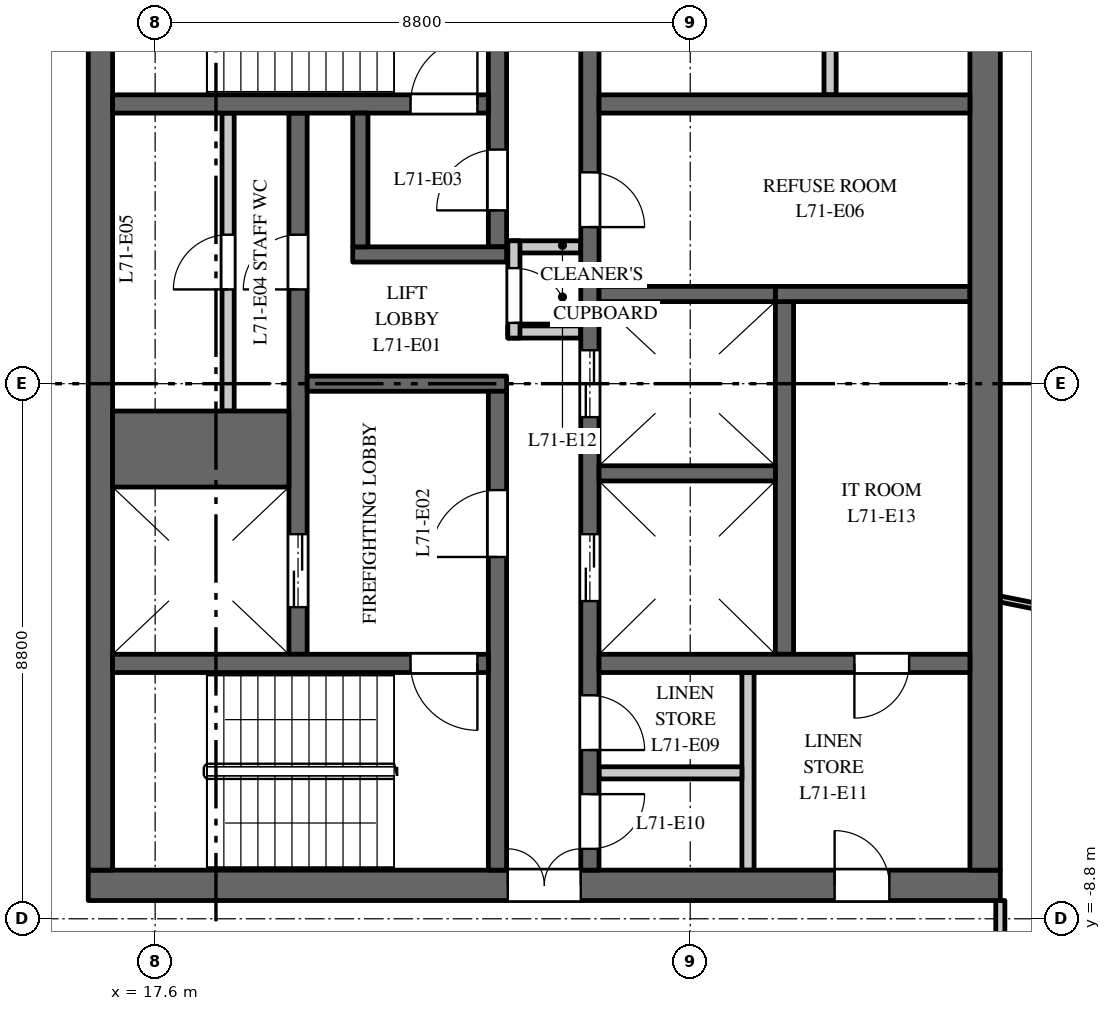
"""IFC4 building model, lengths in metres.
Left out: names, types, materials, properties, quantities, classifications, styles, units other than length and angle.
Written with IfcOpenShell. Run it as: python <this file> out.ifc"""

import sys

from ifc_helpers import new_model, si_unit, direction, frame, frame_2d, origin, place, context, subcontext, project, spatial, rectangle, extrude, element, fill, save


model = new_model("IFC4")
c1 = context("Model", 3, precision=1e-05, world=origin(), true_north=direction((0.0, 1.0)))
c2 = subcontext(c1, "Body", "Model", "MODEL_VIEW")
j1 = project(units=[si_unit("LENGTHUNIT", "METRE"), si_unit("PLANEANGLEUNIT", "RADIAN")], contexts=[c1])
p1 = place(None, origin())
s1 = spatial("IfcSite", under=j1, at=p1, CompositionType="ELEMENT")
p2 = place(p1, origin())
s2 = spatial("IfcBuilding", under=s1, at=p2, CompositionType="ELEMENT")
p3 = place(p2, frame((0.0, 0.0, 327.0)))
s3 = spatial("IfcBuildingStorey", under=s2, at=p3, CompositionType="ELEMENT", Elevation=327.0)
p4 = place(p3, frame((16.5, -8.25, 0.0), z_axis=(0.0, 0.0, 1.0), x_axis=(1.0, 0.0, 0.0)))
e1 = element("IfcWall", 1, at=p4, inside=s3, PredefinedType="SHEAR", context=c2, shape_type="SweptSolid", body=[
    extrude(rectangle(XDim=15.0, YDim=0.5, at=frame_2d((7.5, 0.0))), origin(), (0.0, 0.0, 1.0), 3.7),
])
p5 = place(p4, frame((6.9, 0.0, 0.0)))
e2 = element("IfcOpeningElement", 2, at=p5, cuts=e1, PredefinedType="OPENING", context=c2, shape_type="SweptSolid", body=[
    extrude(rectangle(XDim=1.2, YDim=2.1, at=frame_2d((0.6, 1.05))), frame((0.0, 0.26, 0.0), z_axis=(0.0, -1.0, 0.0), x_axis=(1.0, 0.0, 0.0)), (0.0, 0.0, 1.0), 0.52),
])
p6 = place(p4, frame((12.275, 0.0, 0.0)))
e3 = element("IfcOpeningElement", 3, at=p6, cuts=e1, PredefinedType="OPENING", context=c2, shape_type="SweptSolid", body=[
    extrude(rectangle(XDim=0.9, YDim=2.1, at=frame_2d((0.45, 1.05))), frame((0.0, 0.26, 0.0), z_axis=(0.0, -1.0, 0.0), x_axis=(1.0, 0.0, 0.0)), (0.0, 0.0, 1.0), 0.52),
])
p7 = place(p3, frame((18.8, -0.45, 0.0), z_axis=(0.0, 0.0, 1.0), x_axis=(0.0, 1.0, 0.0)))
e4 = element("IfcWall", 4, at=p7, inside=s3, PredefinedType="PARTITIONING", context=c2, shape_type="SweptSolid", body=[
    extrude(rectangle(XDim=4.9, YDim=0.2, at=frame_2d((2.45, 0.0))), origin(), (0.0, 0.0, 1.0), 3.7),
])
p8 = place(p7, frame((2.0, 0.0, 0.0)))
e5 = element("IfcOpeningElement", 5, at=p8, cuts=e4, PredefinedType="OPENING", context=c2, shape_type="SweptSolid", body=[
    extrude(rectangle(XDim=0.9, YDim=2.1, at=frame_2d((0.45, 1.05))), frame((0.0, 0.11, 0.0), z_axis=(0.0, -1.0, 0.0), x_axis=(1.0, 0.0, 0.0)), (0.0, 0.0, 1.0), 0.22),
])
p9 = place(p3, frame((27.95, -4.45, 0.0), z_axis=(0.0, 0.0, 1.0), x_axis=(0.0, 1.0, 0.0)))
e6 = element("IfcWall", 6, at=p9, inside=s3, PredefinedType="SHEAR", context=c2, shape_type="SweptSolid", body=[
    extrude(rectangle(XDim=5.8, YDim=0.3, at=frame_2d((2.9, 0.0))), origin(), (0.0, 0.0, 1.0), 3.7),
])
p10 = place(p3, frame((27.8, 1.475, 0.0), z_axis=(0.0, 0.0, 1.0), x_axis=(1.0, 0.0, 0.0)))
e7 = element("IfcWall", 7, at=p10, inside=s3, PredefinedType="SHEAR", context=c2, shape_type="SweptSolid", body=[
    extrude(rectangle(XDim=3.2, YDim=0.25, at=frame_2d((1.6, 0.0))), origin(), (0.0, 0.0, 1.0), 3.7),
])
p11 = place(p3, frame((19.95, -4.45, 0.0), z_axis=(0.0, 0.0, 1.0), x_axis=(0.0, 1.0, 0.0)))
e8 = element("IfcWall", 8, at=p11, inside=s3, PredefinedType="SHEAR", context=c2, shape_type="SweptSolid", body=[
    extrude(rectangle(XDim=8.9, YDim=0.3, at=frame_2d((4.45, 0.0))), origin(), (0.0, 0.0, 1.0), 3.7),
])
p12 = place(p11, frame((0.775, 0.0, 0.0)))
e9 = element("IfcOpeningElement", 9, at=p12, cuts=e8, PredefinedType="OPENING", context=c2, shape_type="SweptSolid", body=[
    extrude(rectangle(XDim=1.2, YDim=2.1, at=frame_2d((0.6, 1.05))), frame((0.0, 0.16, 0.0), z_axis=(0.0, -1.0, 0.0), x_axis=(1.0, 0.0, 0.0)), (0.0, 0.0, 1.0), 0.32),
])
p13 = place(p11, frame((6.0, 0.0, 0.0)))
e10 = element("IfcOpeningElement", 10, at=p13, cuts=e8, PredefinedType="OPENING", context=c2, shape_type="SweptSolid", body=[
    extrude(rectangle(XDim=0.9, YDim=2.1, at=frame_2d((0.45, 1.05))), frame((0.0, 0.16, 0.0), z_axis=(0.0, -1.0, 0.0), x_axis=(1.0, 0.0, 0.0)), (0.0, 0.0, 1.0), 0.32),
])
p14 = place(p3, frame((24.75, -8.0, 0.0), z_axis=(0.0, 0.0, 1.0), x_axis=(0.0, 1.0, 0.0)))
e11 = element("IfcWall", 11, at=p14, inside=s3, PredefinedType="SHEAR", context=c2, shape_type="SweptSolid", body=[
    extrude(rectangle(XDim=16.0, YDim=0.3, at=frame_2d((8.0, 0.0))), origin(), (0.0, 0.0, 1.0), 3.7),
])
p15 = place(p14, frame((4.425, 0.0, 0.0)))
e12 = element("IfcOpeningElement", 12, at=p15, cuts=e11, PredefinedType="OPENING", context=c2, shape_type="SweptSolid", body=[
    extrude(rectangle(XDim=1.1, YDim=2.1, at=frame_2d((0.55, 1.05))), frame((0.0, 0.16, 0.0), z_axis=(0.0, -1.0, 0.0), x_axis=(1.0, 0.0, 0.0)), (0.0, 0.0, 1.0), 0.32),
])
p16 = place(p14, frame((7.45, 0.0, 0.0)))
e13 = element("IfcOpeningElement", 13, at=p16, cuts=e11, PredefinedType="OPENING", context=c2, shape_type="SweptSolid", body=[
    extrude(rectangle(XDim=1.1, YDim=2.1, at=frame_2d((0.55, 1.05))), frame((0.0, 0.16, 0.0), z_axis=(0.0, -1.0, 0.0), x_axis=(1.0, 0.0, 0.0)), (0.0, 0.0, 1.0), 0.32),
])
p17 = place(p14, frame((10.575, 0.0, 0.0)))
e14 = element("IfcOpeningElement", 14, at=p17, cuts=e11, PredefinedType="OPENING", context=c2, shape_type="SweptSolid", body=[
    extrude(rectangle(XDim=0.9, YDim=2.1, at=frame_2d((0.45, 1.05))), frame((0.0, 0.16, 0.0), z_axis=(0.0, -1.0, 0.0), x_axis=(1.0, 0.0, 0.0)), (0.0, 0.0, 1.0), 0.32),
])
p18 = place(p14, frame((13.75, 0.0, 0.0)))
e15 = element("IfcOpeningElement", 15, at=p18, cuts=e11, PredefinedType="OPENING", context=c2, shape_type="SweptSolid", body=[
    extrude(rectangle(XDim=0.9, YDim=2.1, at=frame_2d((0.45, 1.05))), frame((0.0, 0.16, 0.0), z_axis=(0.0, -1.0, 0.0), x_axis=(1.0, 0.0, 0.0)), (0.0, 0.0, 1.0), 0.32),
])
p19 = place(p14, frame((1.975, 0.0, 0.0)))
e16 = element("IfcOpeningElement", 16, at=p19, cuts=e11, PredefinedType="OPENING", context=c2, shape_type="SweptSolid", body=[
    extrude(rectangle(XDim=0.9, YDim=2.1, at=frame_2d((0.45, 1.05))), frame((0.0, 0.16, 0.0), z_axis=(0.0, -1.0, 0.0), x_axis=(1.0, 0.0, 0.0)), (0.0, 0.0, 1.0), 0.32),
])
p20 = place(p14, frame((0.35, 0.0, 0.0)))
e17 = element("IfcOpeningElement", 17, at=p20, cuts=e11, PredefinedType="OPENING", context=c2, shape_type="SweptSolid", body=[
    extrude(rectangle(XDim=0.9, YDim=2.1, at=frame_2d((0.45, 1.05))), frame((0.0, 0.16, 0.0), z_axis=(0.0, -1.0, 0.0), x_axis=(1.0, 0.0, 0.0)), (0.0, 0.0, 1.0), 0.32),
])
p21 = place(p3, frame((20.1, 0.0, 0.0), z_axis=(0.0, 0.0, 1.0), x_axis=(1.0, 0.0, 0.0)))
e18 = element("IfcWall", 18, at=p21, inside=s3, PredefinedType="SHEAR", context=c2, shape_type="SweptSolid", body=[
    extrude(rectangle(XDim=3.28, YDim=0.25, at=frame_2d((1.64, 0.0))), origin(), (0.0, 0.0, 1.0), 3.7),
])
p22 = place(p3, frame((16.7, -8.0, 0.0), z_axis=(0.0, 0.0, 1.0), x_axis=(0.0, 1.0, 0.0)))
e19 = element("IfcWall", 19, at=p22, inside=s3, PredefinedType="SHEAR", context=c2, shape_type="SweptSolid", body=[
    extrude(rectangle(XDim=16.0, YDim=0.4, at=frame_2d((8.0, 0.0))), origin(), (0.0, 0.0, 1.0), 3.7),
])
for number, where, z_axis, x_axis in (
    (20, (23.4, 0.85, 0.0), (0.0, 0.0, 1.0), (1.0, 0.0, 0.0)),
    (21, (23.4, 2.25, 0.0), (0.0, 0.0, 1.0), (1.0, 0.0, 0.0)),
):
    element("IfcWall", number, at=place(p3, frame(where, z_axis=z_axis, x_axis=x_axis)), inside=s3, PredefinedType="PARTITIONING", context=c2, shape_type="SweptSolid", body=[
        extrude(rectangle(XDim=1.2, YDim=0.2, at=frame_2d((0.6, 0.0))), origin(), (0.0, 0.0, 1.0), 3.7),
    ])
p23 = place(p3, frame((23.5, 0.75, 0.0), z_axis=(0.0, 0.0, 1.0), x_axis=(0.0, 1.0, 0.0)))
e22 = element("IfcWall", 22, at=p23, inside=s3, PredefinedType="PARTITIONING", context=c2, shape_type="SweptSolid", body=[
    extrude(rectangle(XDim=1.6, YDim=0.2, at=frame_2d((0.8, 0.0))), origin(), (0.0, 0.0, 1.0), 3.7),
])
p24 = place(p23, frame((0.25, 0.0, 0.0)))
e23 = element("IfcOpeningElement", 23, at=p24, cuts=e22, PredefinedType="OPENING", context=c2, shape_type="SweptSolid", body=[
    extrude(rectangle(XDim=0.9, YDim=2.1, at=frame_2d((0.45, 1.05))), frame((0.0, 0.11, 0.0), z_axis=(0.0, -1.0, 0.0), x_axis=(1.0, 0.0, 0.0)), (0.0, 0.0, 1.0), 0.22),
])
p25 = place(p3, frame((31.25, -8.0, 0.0), z_axis=(0.0, 0.0, 1.0), x_axis=(0.0, 1.0, 0.0)))
e24 = element("IfcWall", 24, at=p25, inside=s3, PredefinedType="SHEAR", context=c2, shape_type="SweptSolid", body=[
    extrude(rectangle(XDim=16.0, YDim=0.5, at=frame_2d((8.0, 0.0))), origin(), (0.0, 0.0, 1.0), 3.7),
])
p26 = place(p3, frame((24.9, 4.6, 0.0), z_axis=(0.0, 0.0, 1.0), x_axis=(1.0, 0.0, 0.0)))
e25 = element("IfcWall", 25, at=p26, inside=s3, PredefinedType="SHEAR", context=c2, shape_type="SweptSolid", body=[
    extrude(rectangle(XDim=6.1, YDim=0.3, at=frame_2d((3.05, 0.0))), origin(), (0.0, 0.0, 1.0), 3.7),
])
for number, where, z_axis, x_axis in (
    (26, (28.7, 4.75, 0.0), (0.0, 0.0, 1.0), (0.0, 1.0, 0.0)),
    (27, (27.35, -8.0, 0.0), (0.0, 0.0, 1.0), (0.0, 1.0, 0.0)),
):
    element("IfcWall", number, at=place(p3, frame(where, z_axis=z_axis, x_axis=x_axis)), inside=s3, PredefinedType="PARTITIONING", context=c2, shape_type="SweptSolid", body=[
        extrude(rectangle(XDim=3.25, YDim=0.2, at=frame_2d((1.625, 0.0))), origin(), (0.0, 0.0, 1.0), 3.7),
    ])
p27 = place(p3, frame((24.9, -6.4, 0.0), z_axis=(0.0, 0.0, 1.0), x_axis=(1.0, 0.0, 0.0)))
e28 = element("IfcWall", 28, at=p27, inside=s3, PredefinedType="PARTITIONING", context=c2, shape_type="SweptSolid", body=[
    extrude(rectangle(XDim=2.35, YDim=0.2, at=frame_2d((1.175, 0.0))), origin(), (0.0, 0.0, 1.0), 3.7),
])
p28 = place(p3, frame((24.9, -4.6, 0.0), z_axis=(0.0, 0.0, 1.0), x_axis=(1.0, 0.0, 0.0)))
e29 = element("IfcWall", 29, at=p28, inside=s3, PredefinedType="SHEAR", context=c2, shape_type="SweptSolid", body=[
    extrude(rectangle(XDim=6.1, YDim=0.3, at=frame_2d((3.05, 0.0))), origin(), (0.0, 0.0, 1.0), 3.7),
])
p29 = place(p28, frame((4.2, 0.0, 0.0)))
e30 = element("IfcOpeningElement", 30, at=p29, cuts=e29, PredefinedType="OPENING", context=c2, shape_type="SweptSolid", body=[
    extrude(rectangle(XDim=0.9, YDim=2.1, at=frame_2d((0.45, 1.05))), frame((0.0, 0.16, 0.0), z_axis=(0.0, -1.0, 0.0), x_axis=(1.0, 0.0, 0.0)), (0.0, 0.0, 1.0), 0.32),
])
p30 = place(p3, frame((16.9, -1.075, 0.0), z_axis=(0.0, 0.0, 1.0), x_axis=(1.0, 0.0, 0.0)))
e31 = element("IfcWall", 31, at=p30, inside=s3, PredefinedType="SHEAR", context=c2, shape_type="SweptSolid", body=[
    extrude(rectangle(XDim=2.9, YDim=1.25, at=frame_2d((1.45, 0.0))), origin(), (0.0, 0.0, 1.0), 3.7),
])
for number, where, z_axis, x_axis in (
    (32, (24.9, -1.475, 0.0), (0.0, 0.0, 1.0), (1.0, 0.0, 0.0)),
    (33, (24.9, 1.475, 0.0), (0.0, 0.0, 1.0), (1.0, 0.0, 0.0)),
):
    element("IfcWall", number, at=place(p3, frame(where, z_axis=z_axis, x_axis=x_axis)), inside=s3, PredefinedType="SHEAR", context=c2, shape_type="SweptSolid", body=[
        extrude(rectangle(XDim=2.9, YDim=0.25, at=frame_2d((1.45, 0.0))), origin(), (0.0, 0.0, 1.0), 3.7),
    ])
p31 = place(p3, frame((23.23, 2.25, 0.0), z_axis=(0.0, 0.0, 1.0), x_axis=(0.0, 1.0, 0.0)))
e34 = element("IfcWall", 34, at=p31, inside=s3, PredefinedType="SHEAR", context=c2, shape_type="SweptSolid", body=[
    extrude(rectangle(XDim=5.75, YDim=0.3, at=frame_2d((2.875, 0.0))), origin(), (0.0, 0.0, 1.0), 3.7),
])
p32 = place(p31, frame((0.6, 0.0, 0.0)))
e35 = element("IfcOpeningElement", 35, at=p32, cuts=e34, PredefinedType="OPENING", context=c2, shape_type="SweptSolid", body=[
    extrude(rectangle(XDim=1.0, YDim=2.1, at=frame_2d((0.5, 1.05))), frame((0.0, 0.16, 0.0), z_axis=(0.0, -1.0, 0.0), x_axis=(1.0, 0.0, 0.0)), (0.0, 0.0, 1.0), 0.32),
])
p33 = place(p3, frame((23.23, -8.0, 0.0), z_axis=(0.0, 0.0, 1.0), x_axis=(0.0, 1.0, 0.0)))
e36 = element("IfcWall", 36, at=p33, inside=s3, PredefinedType="SHEAR", context=c2, shape_type="SweptSolid", body=[
    extrude(rectangle(XDim=7.875, YDim=0.3, at=frame_2d((3.938, 0.0))), origin(), (0.0, 0.0, 1.0), 3.7),
])
p34 = place(p33, frame((5.15, 0.0, 0.0)))
e37 = element("IfcOpeningElement", 37, at=p34, cuts=e36, PredefinedType="OPENING", context=c2, shape_type="SweptSolid", body=[
    extrude(rectangle(XDim=1.1, YDim=2.1, at=frame_2d((0.55, 1.05))), frame((0.0, 0.16, 0.0), z_axis=(0.0, -1.0, 0.0), x_axis=(1.0, 0.0, 0.0)), (0.0, 0.0, 1.0), 0.32),
])
p35 = place(p3, frame((16.9, 4.6, 0.0), z_axis=(0.0, 0.0, 1.0), x_axis=(1.0, 0.0, 0.0)))
e38 = element("IfcWall", 38, at=p35, inside=s3, PredefinedType="SHEAR", context=c2, shape_type="SweptSolid", body=[
    extrude(rectangle(XDim=6.18, YDim=0.3, at=frame_2d((3.09, 0.0))), origin(), (0.0, 0.0, 1.0), 3.7),
])
p36 = place(p35, frame((4.9, 0.0, 0.0)))
e39 = element("IfcOpeningElement", 39, at=p36, cuts=e38, PredefinedType="OPENING", context=c2, shape_type="SweptSolid", body=[
    extrude(rectangle(XDim=1.1, YDim=2.1, at=frame_2d((0.55, 1.05))), frame((0.0, 0.16, 0.0), z_axis=(0.0, -1.0, 0.0), x_axis=(1.0, 0.0, 0.0)), (0.0, 0.0, 1.0), 0.32),
])
p37 = place(p3, frame((16.9, -4.6, 0.0), z_axis=(0.0, 0.0, 1.0), x_axis=(1.0, 0.0, 0.0)))
e40 = element("IfcWall", 40, at=p37, inside=s3, PredefinedType="SHEAR", context=c2, shape_type="SweptSolid", body=[
    extrude(rectangle(XDim=6.18, YDim=0.3, at=frame_2d((3.09, 0.0))), origin(), (0.0, 0.0, 1.0), 3.7),
])
p38 = place(p37, frame((4.9, 0.0, 0.0)))
e41 = element("IfcOpeningElement", 41, at=p38, cuts=e40, PredefinedType="OPENING", context=c2, shape_type="SweptSolid", body=[
    extrude(rectangle(XDim=1.1, YDim=2.1, at=frame_2d((0.55, 1.05))), frame((0.0, 0.16, 0.0), z_axis=(0.0, -1.0, 0.0), x_axis=(1.0, 0.0, 0.0)), (0.0, 0.0, 1.0), 0.32),
])
p39 = place(p3, frame((20.85, 2.125, 0.0), z_axis=(0.0, 0.0, 1.0), x_axis=(1.0, 0.0, 0.0)))
e42 = element("IfcWall", 42, at=p39, inside=s3, PredefinedType="SHEAR", context=c2, shape_type="SweptSolid", body=[
    extrude(rectangle(XDim=2.53, YDim=0.25, at=frame_2d((1.265, 0.0))), origin(), (0.0, 0.0, 1.0), 3.7),
])
p40 = place(p3, frame((20.975, 2.25, 0.0), z_axis=(0.0, 0.0, 1.0), x_axis=(0.0, 1.0, 0.0)))
e43 = element("IfcWall", 43, at=p40, inside=s3, PredefinedType="SHEAR", context=c2, shape_type="SweptSolid", body=[
    extrude(rectangle(XDim=2.2, YDim=0.25, at=frame_2d((1.1, 0.0))), origin(), (0.0, 0.0, 1.0), 3.7),
])
p41 = place(p3, frame((31.5, -10.7, 0.0), z_axis=(0.0, 0.0, 1.0), x_axis=(0.0, 1.0, 0.0)))
e44 = element("IfcWall", 44, at=p41, inside=s3, PredefinedType="PARTITIONING", context=c2, shape_type="SweptSolid", body=[
    extrude(rectangle(XDim=2.2, YDim=0.15, at=frame_2d((1.1, 0.0))), origin(), (0.0, 0.0, 1.0), 3.0),
])
p42 = place(p3, frame((31.5, -3.542, 0.0), z_axis=(0.0, 0.0, 1.0), x_axis=(0.980357474535, -0.197228857227, 0.0)))
e45 = element("IfcWall", 45, at=p42, inside=s3, PredefinedType="PARTITIONING", context=c2, shape_type="SweptSolid", body=[
    extrude(rectangle(XDim=4.092, YDim=0.1, at=frame_2d((2.046, 0.0))), origin(), (0.0, 0.0, 1.0), 3.0),
])
p43 = place(p12, origin())
e46 = element("IfcDoor", 46, at=p43, inside=s3, OperationType="DOUBLE_DOOR_SLIDING", PredefinedType="DOOR", context=c2, shape_type="SweptSolid", body=[
    extrude(rectangle(XDim=1.2, YDim=2.1, at=frame_2d((0.6, 1.05))), frame((0.0, 0.025, 0.0), z_axis=(0.0, -1.0, 0.0), x_axis=(1.0, 0.0, 0.0)), (0.0, 0.0, 1.0), 0.05),
])
fill(e9, e46)
p44 = place(p15, origin())
e47 = element("IfcDoor", 47, at=p44, inside=s3, OperationType="DOUBLE_DOOR_SLIDING", PredefinedType="DOOR", context=c2, shape_type="SweptSolid", body=[
    extrude(rectangle(XDim=1.1, YDim=2.1, at=frame_2d((0.55, 1.05))), frame((0.0, 0.025, 0.0), z_axis=(0.0, -1.0, 0.0), x_axis=(1.0, 0.0, 0.0)), (0.0, 0.0, 1.0), 0.05),
])
fill(e12, e47)
p45 = place(p16, origin())
e48 = element("IfcDoor", 48, at=p45, inside=s3, OperationType="DOUBLE_DOOR_SLIDING", PredefinedType="DOOR", context=c2, shape_type="SweptSolid", body=[
    extrude(rectangle(XDim=1.1, YDim=2.1, at=frame_2d((0.55, 1.05))), frame((0.0, 0.025, 0.0), z_axis=(0.0, -1.0, 0.0), x_axis=(1.0, 0.0, 0.0)), (0.0, 0.0, 1.0), 0.05),
])
fill(e13, e48)
p46 = place(p36, origin())
e49 = element("IfcDoor", 49, at=p46, inside=s3, OperationType="SINGLE_SWING_LEFT", PredefinedType="DOOR", context=c2, shape_type="SweptSolid", body=[
    extrude(rectangle(XDim=1.1, YDim=2.1, at=frame_2d((0.55, 1.05))), frame((0.0, 0.025, 0.0), z_axis=(0.0, -1.0, 0.0), x_axis=(1.0, 0.0, 0.0)), (0.0, 0.0, 1.0), 0.05),
])
fill(e39, e49)
p47 = place(p38, origin())
e50 = element("IfcDoor", 50, at=p47, inside=s3, OperationType="SINGLE_SWING_RIGHT", PredefinedType="DOOR", context=c2, shape_type="SweptSolid", body=[
    extrude(rectangle(XDim=1.1, YDim=2.1, at=frame_2d((0.55, 1.05))), frame((0.0, 0.025, 0.0), z_axis=(0.0, -1.0, 0.0), x_axis=(1.0, 0.0, 0.0)), (0.0, 0.0, 1.0), 0.05),
])
fill(e41, e50)
p48 = place(p34, origin())
e51 = element("IfcDoor", 51, at=p48, inside=s3, OperationType="SINGLE_SWING_RIGHT", PredefinedType="DOOR", context=c2, shape_type="SweptSolid", body=[
    extrude(rectangle(XDim=1.1, YDim=2.1, at=frame_2d((0.55, 1.05))), frame((0.0, 0.025, 0.0), z_axis=(0.0, -1.0, 0.0), x_axis=(1.0, 0.0, 0.0)), (0.0, 0.0, 1.0), 0.05),
])
fill(e37, e51)
p49 = place(p32, origin())
e52 = element("IfcDoor", 52, at=p49, inside=s3, OperationType="SINGLE_SWING_RIGHT", PredefinedType="DOOR", context=c2, shape_type="SweptSolid", body=[
    extrude(rectangle(XDim=1.0, YDim=2.1, at=frame_2d((0.5, 1.05))), frame((0.0, 0.025, 0.0), z_axis=(0.0, -1.0, 0.0), x_axis=(1.0, 0.0, 0.0)), (0.0, 0.0, 1.0), 0.05),
])
fill(e35, e52)
p50 = place(p5, origin())
e53 = element("IfcDoor", 53, at=p50, inside=s3, OperationType="DOUBLE_DOOR_DOUBLE_SWING", PredefinedType="DOOR", context=c2, shape_type="SweptSolid", body=[
    extrude(rectangle(XDim=1.2, YDim=2.1, at=frame_2d((0.6, 1.05))), frame((0.0, 0.025, 0.0), z_axis=(0.0, -1.0, 0.0), x_axis=(1.0, 0.0, 0.0)), (0.0, 0.0, 1.0), 0.05),
])
fill(e2, e53)
p51 = place(p13, origin())
e54 = element("IfcDoor", 54, at=p51, inside=s3, OperationType="SINGLE_SWING_RIGHT", PredefinedType="DOOR", context=c2, shape_type="SweptSolid", body=[
    extrude(rectangle(XDim=0.9, YDim=2.1, at=frame_2d((0.45, 1.05))), frame((0.0, 0.025, 0.0), z_axis=(0.0, -1.0, 0.0), x_axis=(1.0, 0.0, 0.0)), (0.0, 0.0, 1.0), 0.05),
])
fill(e10, e54)
p52 = place(p8, origin())
e55 = element("IfcDoor", 55, at=p52, inside=s3, OperationType="SINGLE_SWING_RIGHT", PredefinedType="DOOR", context=c2, shape_type="SweptSolid", body=[
    extrude(rectangle(XDim=0.9, YDim=2.1, at=frame_2d((0.45, 1.05))), frame((0.0, 0.025, 0.0), z_axis=(0.0, -1.0, 0.0), x_axis=(1.0, 0.0, 0.0)), (0.0, 0.0, 1.0), 0.05),
])
fill(e5, e55)
p53 = place(p17, origin())
e56 = element("IfcDoor", 56, at=p53, inside=s3, OperationType="SINGLE_SWING_LEFT", PredefinedType="DOOR", context=c2, shape_type="SweptSolid", body=[
    extrude(rectangle(XDim=0.9, YDim=2.1, at=frame_2d((0.45, 1.05))), frame((0.0, 0.025, 0.0), z_axis=(0.0, -1.0, 0.0), x_axis=(1.0, 0.0, 0.0)), (0.0, 0.0, 1.0), 0.05),
])
fill(e14, e56)
p54 = place(p19, origin())
e57 = element("IfcDoor", 57, at=p54, inside=s3, OperationType="SINGLE_SWING_LEFT", PredefinedType="DOOR", context=c2, shape_type="SweptSolid", body=[
    extrude(rectangle(XDim=0.9, YDim=2.1, at=frame_2d((0.45, 1.05))), frame((0.0, 0.025, 0.0), z_axis=(0.0, -1.0, 0.0), x_axis=(1.0, 0.0, 0.0)), (0.0, 0.0, 1.0), 0.05),
])
fill(e16, e57)
p55 = place(p20, origin())
e58 = element("IfcDoor", 58, at=p55, inside=s3, OperationType="SINGLE_SWING_RIGHT", PredefinedType="DOOR", context=c2, shape_type="SweptSolid", body=[
    extrude(rectangle(XDim=0.9, YDim=2.1, at=frame_2d((0.45, 1.05))), frame((0.0, 0.025, 0.0), z_axis=(0.0, -1.0, 0.0), x_axis=(1.0, 0.0, 0.0)), (0.0, 0.0, 1.0), 0.05),
])
fill(e17, e58)
p56 = place(p6, origin())
e59 = element("IfcDoor", 59, at=p56, inside=s3, OperationType="SINGLE_SWING_RIGHT", PredefinedType="DOOR", context=c2, shape_type="SweptSolid", body=[
    extrude(rectangle(XDim=0.9, YDim=2.1, at=frame_2d((0.45, 1.05))), frame((0.0, 0.025, 0.0), z_axis=(0.0, -1.0, 0.0), x_axis=(1.0, 0.0, 0.0)), (0.0, 0.0, 1.0), 0.05),
])
fill(e3, e59)
p57 = place(p24, origin())
e60 = element("IfcDoor", 60, at=p57, inside=s3, OperationType="SINGLE_SWING_LEFT", PredefinedType="DOOR", context=c2, shape_type="SweptSolid", body=[
    extrude(rectangle(XDim=0.9, YDim=2.1, at=frame_2d((0.45, 1.05))), frame((0.0, 0.025, 0.0), z_axis=(0.0, -1.0, 0.0), x_axis=(1.0, 0.0, 0.0)), (0.0, 0.0, 1.0), 0.05),
])
fill(e23, e60)
p58 = place(p29, origin())
e61 = element("IfcDoor", 61, at=p58, inside=s3, OperationType="SINGLE_SWING_LEFT", PredefinedType="DOOR", context=c2, shape_type="SweptSolid", body=[
    extrude(rectangle(XDim=0.9, YDim=2.1, at=frame_2d((0.45, 1.05))), frame((0.0, 0.025, 0.0), z_axis=(0.0, -1.0, 0.0), x_axis=(1.0, 0.0, 0.0)), (0.0, 0.0, 1.0), 0.05),
])
fill(e30, e61)
save(model, sys.argv[1])
